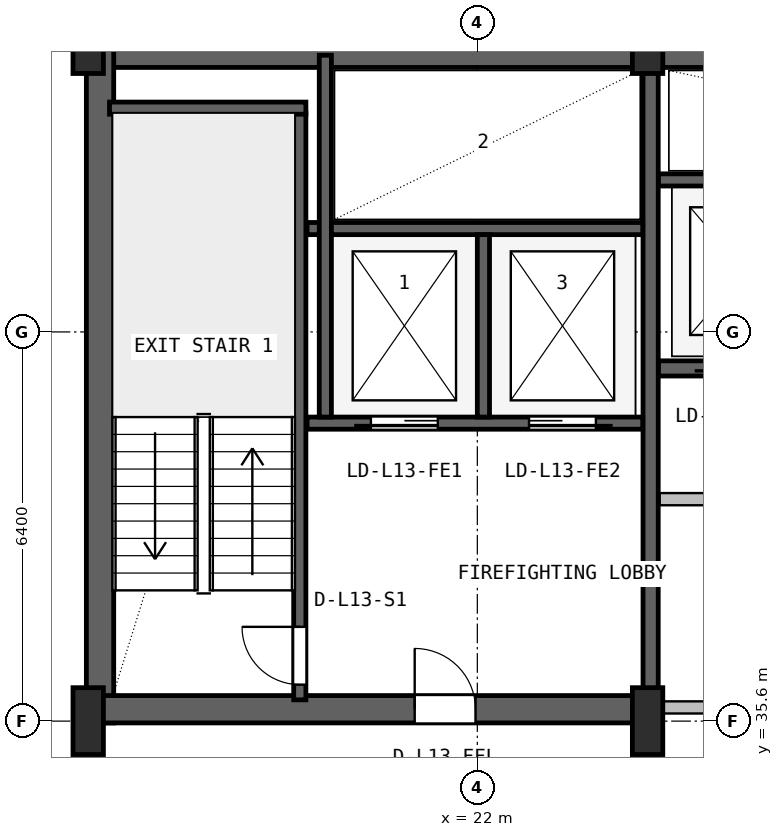
"""IFC4 building model, lengths in metres.
Left out: names, types, materials, properties, quantities, classifications, styles, units other than length and angle.
Written with IfcOpenShell. Run it as: python <this file> out.ifc"""

import sys

from ifc_helpers import new_model, si_unit, direction, frame, frame_2d, origin, origin_2d, place, context, subcontext, project, spatial, rectangle, i_section, extrude, source, transform, mapped, element, fill, save


model = new_model("IFC4")
c1 = context("Model", 3, precision=1e-05, world=origin(), true_north=direction((0.0, 1.0)))
c2 = subcontext(c1, "Body", "Model", "MODEL_VIEW")
j1 = project(units=[si_unit("LENGTHUNIT", "METRE"), si_unit("PLANEANGLEUNIT", "RADIAN")], contexts=[c1])
p1 = place(None, origin())
s1 = spatial("IfcSite", under=j1, at=p1, CompositionType="ELEMENT")
p2 = place(p1, origin())
s2 = spatial("IfcBuilding", under=s1, at=p2, CompositionType="ELEMENT")
p3 = place(p2, frame((0.0, 0.0, 58.8)))
s3 = spatial("IfcBuildingStorey", under=s2, at=p3, CompositionType="ELEMENT", Elevation=58.8)
p4 = place(p3, frame((15.6, 46.575, 0.0), z_axis=(0.0, 0.0, 1.0), x_axis=(1.0, 0.0, 0.0)))
e1 = element("IfcWall", 1, at=p4, inside=s3, PredefinedType="SHEAR", context=c2, shape_type="SweptSolid", body=[
    extrude(rectangle(XDim=36.8, YDim=0.45, at=frame_2d((18.4, 0.0))), origin(), (0.0, 0.0, 1.0), 3.65),
])
p5 = place(p3, frame((15.795, 35.57, 0.0), z_axis=(0.0, 0.0, 1.0), x_axis=(0.0, 1.0, 0.0)))
e2 = element("IfcWall", 2, at=p5, inside=s3, PredefinedType="SHEAR", context=c2, shape_type="SweptSolid", body=[
    extrude(rectangle(XDim=11.23, YDim=0.45, at=frame_2d((5.615, 0.0))), origin(), (0.0, 0.0, 1.0), 3.65),
])
p6 = place(p3, frame((15.57, 35.795, 0.0), z_axis=(0.0, 0.0, 1.0), x_axis=(1.0, 0.0, 0.0)))
e3 = element("IfcWall", 3, at=p6, inside=s3, PredefinedType="SHEAR", context=c2, shape_type="SweptSolid", body=[
    extrude(rectangle(XDim=9.23, YDim=0.45, at=frame_2d((4.615, 0.0))), origin(), (0.0, 0.0, 1.0), 3.65),
])
p7 = place(p6, frame((5.4, 0.0, 0.0)))
e4 = element("IfcOpeningElement", 4, at=p7, cuts=e3, PredefinedType="OPENING", context=c2, shape_type="SweptSolid", body=[
    extrude(rectangle(XDim=1.0, YDim=2.1, at=frame_2d((0.5, 1.05))), frame((0.0, 0.235, 0.0), z_axis=(0.0, -1.0, 0.0), x_axis=(1.0, 0.0, 0.0)), (0.0, 0.0, 1.0), 0.47),
])
m1 = source(origin(), c2, "Body", "SweptSolid", [
    extrude(i_section(OverallWidth=0.5, OverallDepth=1.1, WebThickness=0.018, FlangeThickness=0.032, FilletRadius=0.018, at=origin_2d()), origin(), (0.0, 0.0, 1.0), 3.9),
])
for number, where, z_axis, x_axis in (
    (5, (15.6, 35.6, 0.0), (0.0, 0.0, 1.0), (1.0, 0.0, 0.0)),
    (6, (15.6, 46.8, 0.0), (0.0, 0.0, 1.0), (1.0, 0.0, 0.0)),
    (7, (24.8, 35.6, 0.0), (0.0, 0.0, 1.0), (1.0, 0.0, 0.0)),
    (8, (24.8, 46.8, 0.0), (0.0, 0.0, 1.0), (1.0, 0.0, 0.0)),
):
    element("IfcColumn", number, at=place(p3, frame(where, z_axis=z_axis, x_axis=x_axis)), inside=s3, PredefinedType="COLUMN", context=c2, shape_type="MappedRepresentation", body=[
        mapped(m1, transform((0.0, 0.0, 0.0), x_axis=(1.0, 0.0, 0.0), y_axis=(0.0, 1.0, 0.0), z_axis=(0.0, 0.0, 1.0), scale=1.0)),
    ])
p8 = place(p3, frame((19.08, 35.95, 0.0), z_axis=(0.0, 0.0, 1.0), x_axis=(0.0, 1.0, 0.0)))
e9 = element("IfcWall", 9, at=p8, inside=s3, PredefinedType="SHEAR", context=c2, shape_type="SweptSolid", body=[
    extrude(rectangle(XDim=9.65, YDim=0.2, at=frame_2d((4.825, 0.0))), origin(), (0.0, 0.0, 1.0), 3.65),
])
p9 = place(p8, frame((0.25, 0.0, 0.0)))
e10 = element("IfcOpeningElement", 10, at=p9, cuts=e9, PredefinedType="OPENING", context=c2, shape_type="SweptSolid", body=[
    extrude(rectangle(XDim=0.95, YDim=2.1, at=frame_2d((0.475, 1.05))), frame((0.0, 0.11, 0.0), z_axis=(0.0, -1.0, 0.0), x_axis=(1.0, 0.0, 0.0)), (0.0, 0.0, 1.0), 0.22),
])
p10 = place(p3, frame((15.95, 45.68, 0.0), z_axis=(0.0, 0.0, 1.0), x_axis=(1.0, 0.0, 0.0)))
e11 = element("IfcWall", 11, at=p10, inside=s3, PredefinedType="SHEAR", context=c2, shape_type="SweptSolid", body=[
    extrude(rectangle(XDim=3.23, YDim=0.2, at=frame_2d((1.615, 0.0))), origin(), (0.0, 0.0, 1.0), 3.65),
])
p11 = place(p3, frame((24.85, 36.05, 0.0), z_axis=(0.0, 0.0, 1.0), x_axis=(0.0, 1.0, 0.0)))
e12 = element("IfcWall", 12, at=p11, inside=s3, PredefinedType="SHEAR", context=c2, shape_type="SweptSolid", body=[
    extrude(rectangle(XDim=10.45, YDim=0.25, at=frame_2d((5.225, 0.0))), origin(), (0.0, 0.0, 1.0), 3.65),
])
p12 = place(p3, frame((19.2, 40.5, 0.0), z_axis=(0.0, 0.0, 1.0), x_axis=(1.0, 0.0, 0.0)))
e13 = element("IfcWall", 13, at=p12, inside=s3, PredefinedType="SHEAR", context=c2, shape_type="SweptSolid", body=[
    extrude(rectangle(XDim=5.52, YDim=0.2, at=frame_2d((2.76, 0.0))), origin(), (0.0, 0.0, 1.0), 3.65),
])
p13 = place(p12, frame((1.05, 0.0, 0.0)))
e14 = element("IfcOpeningElement", 14, at=p13, cuts=e13, PredefinedType="OPENING", context=c2, shape_type="SweptSolid", body=[
    extrude(rectangle(XDim=1.1, YDim=2.18, at=frame_2d((0.55, 1.09))), frame((0.0, 0.11, 0.0), z_axis=(0.0, -1.0, 0.0), x_axis=(1.0, 0.0, 0.0)), (0.0, 0.0, 1.0), 0.22),
])
p14 = place(p12, frame((3.65, 0.0, 0.0)))
e15 = element("IfcOpeningElement", 15, at=p14, cuts=e13, PredefinedType="OPENING", context=c2, shape_type="SweptSolid", body=[
    extrude(rectangle(XDim=1.1, YDim=2.18, at=frame_2d((0.55, 1.09))), frame((0.0, 0.11, 0.0), z_axis=(0.0, -1.0, 0.0), x_axis=(1.0, 0.0, 0.0)), (0.0, 0.0, 1.0), 0.22),
])
p15 = place(p3, frame((19.2, 43.7, 0.0), z_axis=(0.0, 0.0, 1.0), x_axis=(1.0, 0.0, 0.0)))
e16 = element("IfcWall", 16, at=p15, inside=s3, PredefinedType="SHEAR", context=c2, shape_type="SweptSolid", body=[
    extrude(rectangle(XDim=5.52, YDim=0.2, at=frame_2d((2.76, 0.0))), origin(), (0.0, 0.0, 1.0), 3.65),
])
p16 = place(p3, frame((22.1, 40.6, 0.0), z_axis=(0.0, 0.0, 1.0), x_axis=(0.0, 1.0, 0.0)))
e17 = element("IfcWall", 17, at=p16, inside=s3, PredefinedType="SHEAR", context=c2, shape_type="SweptSolid", body=[
    extrude(rectangle(XDim=3.0, YDim=0.2, at=frame_2d((1.5, 0.0))), origin(), (0.0, 0.0, 1.0), 3.65),
])
p17 = place(p3, frame((19.5, 40.6, 0.0), z_axis=(0.0, 0.0, 1.0), x_axis=(0.0, 1.0, 0.0)))
e18 = element("IfcWall", 18, at=p17, inside=s3, PredefinedType="SHEAR", context=c2, shape_type="SweptSolid", body=[
    extrude(rectangle(XDim=5.95, YDim=0.2, at=frame_2d((2.975, 0.0))), origin(), (0.0, 0.0, 1.0), 3.65),
])
p18 = place(p3, frame((24.98, 41.4, 0.0), z_axis=(0.0, 0.0, 1.0), x_axis=(1.0, 0.0, 0.0)))
e19 = element("IfcWall", 19, at=p18, inside=s3, PredefinedType="SHEAR", context=c2, shape_type="SweptSolid", body=[
    extrude(rectangle(XDim=23.82, YDim=0.25, at=frame_2d((11.91, 0.0))), origin(), (0.0, 0.0, 1.0), 3.65),
])
p19 = place(p18, frame((0.87, 0.0, 0.0)))
e20 = element("IfcOpeningElement", 20, at=p19, cuts=e19, PredefinedType="OPENING", context=c2, shape_type="SweptSolid", body=[
    extrude(rectangle(XDim=1.1, YDim=2.18, at=frame_2d((0.55, 1.09))), frame((0.0, 0.135, 0.0), z_axis=(0.0, -1.0, 0.0), x_axis=(1.0, 0.0, 0.0)), (0.0, 0.0, 1.0), 0.27),
])
p20 = place(p18, frame((3.47, 0.0, 0.0)))
e21 = element("IfcOpeningElement", 21, at=p20, cuts=e19, PredefinedType="OPENING", context=c2, shape_type="SweptSolid", body=[
    extrude(rectangle(XDim=1.1, YDim=2.18, at=frame_2d((0.55, 1.09))), frame((0.0, 0.135, 0.0), z_axis=(0.0, -1.0, 0.0), x_axis=(1.0, 0.0, 0.0)), (0.0, 0.0, 1.0), 0.27),
])
p21 = place(p18, frame((6.07, 0.0, 0.0)))
e22 = element("IfcOpeningElement", 22, at=p21, cuts=e19, PredefinedType="OPENING", context=c2, shape_type="SweptSolid", body=[
    extrude(rectangle(XDim=1.1, YDim=2.18, at=frame_2d((0.55, 1.09))), frame((0.0, 0.135, 0.0), z_axis=(0.0, -1.0, 0.0), x_axis=(1.0, 0.0, 0.0)), (0.0, 0.0, 1.0), 0.27),
])
p22 = place(p3, frame((24.98, 44.5, 0.0), z_axis=(0.0, 0.0, 1.0), x_axis=(1.0, 0.0, 0.0)))
e23 = element("IfcWall", 23, at=p22, inside=s3, PredefinedType="SHEAR", context=c2, shape_type="SweptSolid", body=[
    extrude(rectangle(XDim=7.87, YDim=0.2, at=frame_2d((3.935, 0.0))), origin(), (0.0, 0.0, 1.0), 3.65),
])
p23 = place(p3, frame((25.0, 35.825, 0.0), z_axis=(0.0, 0.0, 1.0), x_axis=(1.0, 0.0, 0.0)))
e24 = element("IfcWall", 24, at=p23, inside=s3, PredefinedType="PLUMBINGWALL", context=c2, shape_type="SweptSolid", body=[
    extrude(rectangle(XDim=9.75, YDim=0.2, at=frame_2d((4.875, 0.0))), origin(), (0.0, 0.0, 1.0), 2.425),
])
p24 = place(p3, frame((25.0, 39.25, 0.0), z_axis=(0.0, 0.0, 1.0), x_axis=(1.0, 0.0, 0.0)))
e25 = element("IfcWall", 25, at=p24, inside=s3, PredefinedType="PLUMBINGWALL", context=c2, shape_type="SweptSolid", body=[
    extrude(rectangle(XDim=9.75, YDim=0.2, at=frame_2d((4.875, 0.0))), origin(), (0.0, 0.0, 1.0), 3.63),
])
p25 = place(p24, frame((1.75, 0.0, 0.0)))
e26 = element("IfcOpeningElement", 26, at=p25, cuts=e25, PredefinedType="OPENING", context=c2, shape_type="SweptSolid", body=[
    extrude(rectangle(XDim=0.9, YDim=2.06, at=frame_2d((0.45, 1.03))), frame((0.0, 0.11, 0.0), z_axis=(0.0, -1.0, 0.0), x_axis=(1.0, 0.0, 0.0)), (0.0, 0.0, 1.0), 0.22),
])
p26 = place(p24, frame((6.725, 0.0, 0.0)))
e27 = element("IfcOpeningElement", 27, at=p26, cuts=e25, PredefinedType="OPENING", context=c2, shape_type="SweptSolid", body=[
    extrude(rectangle(XDim=0.9, YDim=2.06, at=frame_2d((0.45, 1.03))), frame((0.0, 0.11, 0.0), z_axis=(0.0, -1.0, 0.0), x_axis=(1.0, 0.0, 0.0)), (0.0, 0.0, 1.0), 0.22),
])
m2 = source(origin(), c2, "Body", "SweptSolid", [
    extrude(rectangle(XDim=0.95, YDim=2.1, at=frame_2d((0.475, 1.05))), frame((0.0, 0.025, 0.0), z_axis=(0.0, -1.0, 0.0), x_axis=(1.0, 0.0, 0.0)), (0.0, 0.0, 1.0), 0.05),
])
p27 = place(p9, origin())
e28 = element("IfcDoor", 28, at=p27, inside=s3, OperationType="SINGLE_SWING_RIGHT", PredefinedType="DOOR", context=c2, shape_type="MappedRepresentation", body=[
    mapped(m2, transform((0.0, 0.0, 0.0), x_axis=(1.0, 0.0, 0.0), y_axis=(0.0, 1.0, 0.0), z_axis=(0.0, 0.0, 1.0), scale=1.0)),
])
fill(e10, e28)
m3 = source(origin(), c2, "Body", "SweptSolid", [
    extrude(rectangle(XDim=1.0, YDim=2.1, at=frame_2d((0.5, 1.05))), frame((0.0, 0.025, 0.0), z_axis=(0.0, -1.0, 0.0), x_axis=(1.0, 0.0, 0.0)), (0.0, 0.0, 1.0), 0.05),
])
p28 = place(p7, origin())
e29 = element("IfcDoor", 29, at=p28, inside=s3, OperationType="SINGLE_SWING_LEFT", PredefinedType="DOOR", context=c2, shape_type="MappedRepresentation", body=[
    mapped(m3, transform((0.0, 0.0, 0.0), x_axis=(1.0, 0.0, 0.0), y_axis=(0.0, 1.0, 0.0), z_axis=(0.0, 0.0, 1.0), scale=1.0)),
])
fill(e4, e29)
m4 = source(origin(), c2, "Body", "SweptSolid", [
    extrude(rectangle(XDim=1.1, YDim=2.18, at=frame_2d((0.55, 1.09))), frame((0.0, 0.025, 0.0), z_axis=(0.0, -1.0, 0.0), x_axis=(1.0, 0.0, 0.0)), (0.0, 0.0, 1.0), 0.05),
])
p29 = place(p13, frame((1.1, 0.0, 0.0), z_axis=(0.0, 0.0, 1.0), x_axis=(-1.0, 0.0, 0.0)))
e30 = element("IfcDoor", 30, at=p29, inside=s3, OperationType="SLIDING_TO_LEFT", PredefinedType="DOOR", context=c2, shape_type="MappedRepresentation", body=[
    mapped(m4, transform((0.0, 0.0, 0.0), x_axis=(1.0, 0.0, 0.0), y_axis=(0.0, 1.0, 0.0), z_axis=(0.0, 0.0, 1.0), scale=1.0)),
])
fill(e14, e30)
p30 = place(p14, frame((1.1, 0.0, 0.0), z_axis=(0.0, 0.0, 1.0), x_axis=(-1.0, 0.0, 0.0)))
e31 = element("IfcDoor", 31, at=p30, inside=s3, OperationType="SLIDING_TO_RIGHT", PredefinedType="DOOR", context=c2, shape_type="MappedRepresentation", body=[
    mapped(m4, transform((0.0, 0.0, 0.0), x_axis=(1.0, 0.0, 0.0), y_axis=(0.0, 1.0, 0.0), z_axis=(0.0, 0.0, 1.0), scale=1.0)),
])
fill(e15, e31)
save(model, sys.argv[1])
